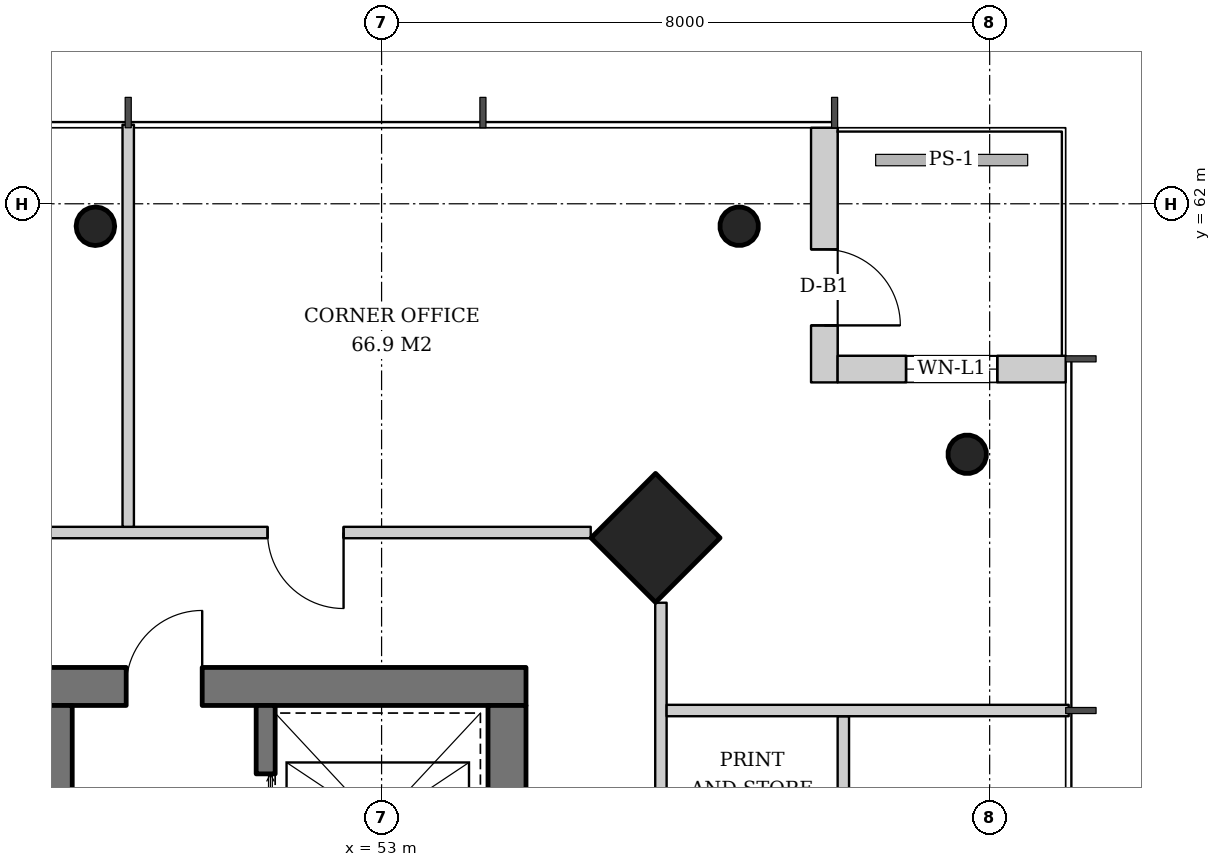
"""IFC4 building model, lengths in metres.
Left out: names, types, materials, properties, quantities, classifications, styles, units other than length and angle.
Written with IfcOpenShell. Run it as: python <this file> out.ifc"""

import sys

from ifc_helpers import new_model, si_unit, direction, frame, frame_2d, origin, origin_2d, place, context, subcontext, project, spatial, rectangle, hollow_circle, extrude, element, fill, save


model = new_model("IFC4")
c1 = context("Model", 3, precision=1e-05, world=origin(), true_north=direction((0.0, 1.0)))
c2 = subcontext(c1, "Body", "Model", "MODEL_VIEW")
j1 = project(units=[si_unit("LENGTHUNIT", "METRE"), si_unit("PLANEANGLEUNIT", "RADIAN")], contexts=[c1])
p1 = place(None, origin())
s1 = spatial("IfcSite", under=j1, at=p1, CompositionType="ELEMENT")
p2 = place(p1, origin())
s2 = spatial("IfcBuilding", under=s1, at=p2, CompositionType="ELEMENT")
p3 = place(p2, frame((0.0, 0.0, 279.4)))
s3 = spatial("IfcBuildingStorey", under=s2, at=p3, CompositionType="ELEMENT", Elevation=279.4)
p4 = place(p3, frame((56.643, 57.643, 0.0), z_axis=(-0.031898107953, -0.031898107953, 0.998981992539), x_axis=(0.707106781187, -0.707106781187, 0.0)))
e1 = element("IfcColumn", 1, at=p4, inside=s3, PredefinedType="COLUMN", context=c2, shape_type="SweptSolid", body=[
    extrude(rectangle(XDim=1.2, YDim=1.2, at=origin_2d()), origin(), (0.0, 0.0, 1.0), 3.804),
])
for number, where, z_axis, x_axis in (
    (2, (60.743, 58.743, 0.0), (-0.032, -0.032, 0.999), (0.707, -0.707, 0.0)),
    (3, (57.743, 61.743, 0.0), (-0.032, -0.032, 0.999), (0.707, -0.707, 0.0)),
):
    element("IfcColumn", number, at=place(p3, frame(where, z_axis=z_axis, x_axis=x_axis)), inside=s3, PredefinedType="COLUMN", context=c2, shape_type="SweptSolid", body=[
        extrude(hollow_circle(Radius=0.254, WallThickness=0.02, at=origin_2d()), origin(), (0.0, 0.0, 1.0), 3.804),
    ])
p5 = place(p3, frame((49.248, 61.743, 0.0), z_axis=(-0.010658893366, -0.031976680097, 0.999431778523), x_axis=(0.948683298051, -0.316227766017, 0.0)))
e4 = element("IfcColumn", 4, at=p5, inside=s3, PredefinedType="COLUMN", context=c2, shape_type="SweptSolid", body=[
    extrude(hollow_circle(Radius=0.254, WallThickness=0.02, at=origin_2d()), origin(), (0.0, 0.0, 1.0), 3.802),
])
p6 = place(p3, frame((35.1, 55.65, 0.0), z_axis=(0.0, 0.0, 1.0), x_axis=(1.0, 0.0, 0.0)))
e5 = element("IfcWall", 5, at=p6, inside=s3, PredefinedType="SHEAR", context=c2, shape_type="SweptSolid", body=[
    extrude(rectangle(XDim=19.8, YDim=0.5, at=frame_2d((9.9, 0.0))), origin(), (0.0, 0.0, 1.0), 3.8),
])
p7 = place(p6, frame((14.54, 0.0, 0.0)))
e6 = element("IfcOpeningElement", 6, at=p7, cuts=e5, PredefinedType="OPENING", context=c2, shape_type="SweptSolid", body=[
    extrude(rectangle(XDim=1.0, YDim=2.1, at=frame_2d((0.5, 1.05))), frame((0.0, 0.26, 0.0), z_axis=(0.0, -1.0, 0.0), x_axis=(1.0, 0.0, 0.0)), (0.0, 0.0, 1.0), 0.52),
])
p8 = place(p6, frame((0.865, 0.0, 0.0)))
e7 = element("IfcOpeningElement", 7, at=p8, cuts=e5, PredefinedType="OPENING", context=c2, shape_type="SweptSolid", body=[
    extrude(rectangle(XDim=1.0, YDim=2.1, at=frame_2d((0.5, 1.05))), frame((0.0, 0.26, 0.0), z_axis=(0.0, -1.0, 0.0), x_axis=(1.0, 0.0, 0.0)), (0.0, 0.0, 1.0), 0.52),
])
p9 = place(p6, frame((2.399, 0.0, 0.0)))
e8 = element("IfcOpeningElement", 8, at=p9, cuts=e5, PredefinedType="OPENING", context=c2, shape_type="SweptSolid", body=[
    extrude(rectangle(XDim=1.0, YDim=2.1, at=frame_2d((0.5, 1.05))), frame((0.0, 0.26, 0.0), z_axis=(0.0, -1.0, 0.0), x_axis=(1.0, 0.0, 0.0)), (0.0, 0.0, 1.0), 0.52),
])
p10 = place(p6, frame((3.966, 0.0, 0.0)))
e9 = element("IfcOpeningElement", 9, at=p10, cuts=e5, PredefinedType="OPENING", context=c2, shape_type="SweptSolid", body=[
    extrude(rectangle(XDim=1.0, YDim=2.1, at=frame_2d((0.5, 1.05))), frame((0.0, 0.26, 0.0), z_axis=(0.0, -1.0, 0.0), x_axis=(1.0, 0.0, 0.0)), (0.0, 0.0, 1.0), 0.52),
])
p11 = place(p3, frame((54.65, 36.6, 0.0), z_axis=(0.0, 0.0, 1.0), x_axis=(0.0, 1.0, 0.0)))
e10 = element("IfcWall", 10, at=p11, inside=s3, PredefinedType="SHEAR", context=c2, shape_type="SweptSolid", body=[
    extrude(rectangle(XDim=18.8, YDim=0.5, at=frame_2d((9.4, 0.0))), origin(), (0.0, 0.0, 1.0), 3.8),
])
p12 = place(p11, frame((8.5, 0.0, 0.0)))
e11 = element("IfcOpeningElement", 11, at=p12, cuts=e10, PredefinedType="OPENING", context=c2, shape_type="SweptSolid", body=[
    extrude(rectangle(XDim=1.8, YDim=2.4, at=frame_2d((0.9, 1.2))), frame((0.0, 0.26, 0.0), z_axis=(0.0, -1.0, 0.0), x_axis=(1.0, 0.0, 0.0)), (0.0, 0.0, 1.0), 0.52),
])
p13 = place(p3, frame((48.73, 52.4, 0.0), z_axis=(0.0, 0.0, 1.0), x_axis=(0.0, 1.0, 0.0)))
e12 = element("IfcWall", 12, at=p13, inside=s3, PredefinedType="SHEAR", context=c2, shape_type="SweptSolid", body=[
    extrude(rectangle(XDim=3.0, YDim=0.4, at=frame_2d((1.5, 0.0))), origin(), (0.0, 0.0, 1.0), 3.8),
])
p14 = place(p13, frame((0.3, 0.0, 0.0)))
e13 = element("IfcOpeningElement", 13, at=p14, cuts=e12, PredefinedType="OPENING", context=c2, shape_type="SweptSolid", body=[
    extrude(rectangle(XDim=1.0, YDim=2.1, at=frame_2d((0.5, 1.05))), frame((0.0, 0.21, 0.0), z_axis=(0.0, -1.0, 0.0), x_axis=(1.0, 0.0, 0.0)), (0.0, 0.0, 1.0), 0.42),
])
p15 = place(p3, frame((58.825, 63.0, 0.0), z_axis=(0.0, 0.0, 1.0), x_axis=(0.0, -1.0, 0.0)))
e14 = element("IfcWall", 14, at=p15, inside=s3, PredefinedType="SOLIDWALL", context=c2, shape_type="SweptSolid", body=[
    extrude(rectangle(XDim=3.35, YDim=0.35, at=frame_2d((1.675, 0.0))), origin(), (0.0, 0.0, 1.0), 3.5),
])
p16 = place(p15, frame((1.6, 0.0, 0.0)))
e15 = element("IfcOpeningElement", 15, at=p16, cuts=e14, PredefinedType="OPENING", context=c2, shape_type="SweptSolid", body=[
    extrude(rectangle(XDim=1.0, YDim=2.4, at=frame_2d((0.5, 1.2))), frame((0.0, 0.185, 0.0), z_axis=(0.0, -1.0, 0.0), x_axis=(1.0, 0.0, 0.0)), (0.0, 0.0, 1.0), 0.37),
])
p17 = place(p3, frame((59.0, 59.825, 0.0), z_axis=(0.0, 0.0, 1.0), x_axis=(1.0, 0.0, 0.0)))
e16 = element("IfcWall", 16, at=p17, inside=s3, PredefinedType="SOLIDWALL", context=c2, shape_type="SweptSolid", body=[
    extrude(rectangle(XDim=3.0, YDim=0.35, at=frame_2d((1.5, 0.0))), origin(), (0.0, 0.0, 1.0), 3.5),
])
p18 = place(p17, frame((0.9, 0.0, 0.6)))
e17 = element("IfcOpeningElement", 17, at=p18, cuts=e16, PredefinedType="OPENING", context=c2, shape_type="SweptSolid", body=[
    extrude(rectangle(XDim=1.2, YDim=2.55, at=frame_2d((0.6, 1.275))), frame((0.0, 0.185, 0.0), z_axis=(0.0, -1.0, 0.0), x_axis=(1.0, 0.0, 0.0)), (0.0, 0.0, 1.0), 0.37),
])
p19 = place(p3, frame((51.475, 52.4, 0.0), z_axis=(0.0, 0.0, 1.0), x_axis=(0.0, 1.0, 0.0)))
e18 = element("IfcWall", 18, at=p19, inside=s3, PredefinedType="SHEAR", context=c2, shape_type="SweptSolid", body=[
    extrude(rectangle(XDim=3.0, YDim=0.25, at=frame_2d((1.5, 0.0))), origin(), (0.0, 0.0, 1.0), 3.8),
])
p20 = place(p19, frame((0.8, 0.0, 0.0)))
e19 = element("IfcOpeningElement", 19, at=p20, cuts=e18, PredefinedType="OPENING", context=c2, shape_type="SweptSolid", body=[
    extrude(rectangle(XDim=1.3, YDim=2.2, at=frame_2d((0.65, 1.1))), frame((0.0, 0.135, 0.0), z_axis=(0.0, -1.0, 0.0), x_axis=(1.0, 0.0, 0.0)), (0.0, 0.0, 1.0), 0.27),
])
p21 = place(p3, frame((59.075, 50.742, 0.0), z_axis=(0.0, 0.0, 1.0), x_axis=(0.0, 1.0, 0.0)))
e20 = element("IfcWall", 20, at=p21, inside=s3, PredefinedType="PARTITIONING", context=c2, shape_type="SweptSolid", body=[
    extrude(rectangle(XDim=4.517, YDim=0.15, at=frame_2d((2.258, 0.0))), origin(), (0.0, 0.0, 1.0), 2.747),
])
p22 = place(p3, frame((56.675, 35.249, 0.0), z_axis=(0.0, 0.0, 1.0), x_axis=(0.0, 1.0, 0.0)))
e21 = element("IfcWall", 21, at=p22, inside=s3, PredefinedType="PARTITIONING", context=c2, shape_type="SweptSolid", body=[
    extrude(rectangle(XDim=21.503, YDim=0.15, at=frame_2d((10.751, 0.0))), origin(), (0.0, 0.0, 1.0), 2.747),
])
p23 = place(p22, frame((3.251, 0.0, 0.0)))
e22 = element("IfcOpeningElement", 22, at=p23, cuts=e21, PredefinedType="OPENING", context=c2, shape_type="SweptSolid", body=[
    extrude(rectangle(XDim=1.0, YDim=2.1, at=frame_2d((0.5, 1.05))), frame((0.0, 0.085, 0.0), z_axis=(0.0, -1.0, 0.0), x_axis=(1.0, 0.0, 0.0)), (0.0, 0.0, 1.0), 0.17),
])
p24 = place(p22, frame((7.918, 0.0, 0.0)))
e23 = element("IfcOpeningElement", 23, at=p24, cuts=e21, PredefinedType="OPENING", context=c2, shape_type="SweptSolid", body=[
    extrude(rectangle(XDim=1.0, YDim=2.1, at=frame_2d((0.5, 1.05))), frame((0.0, 0.085, 0.0), z_axis=(0.0, -1.0, 0.0), x_axis=(1.0, 0.0, 0.0)), (0.0, 0.0, 1.0), 0.17),
])
p25 = place(p22, frame((12.585, 0.0, 0.0)))
e24 = element("IfcOpeningElement", 24, at=p25, cuts=e21, PredefinedType="OPENING", context=c2, shape_type="SweptSolid", body=[
    extrude(rectangle(XDim=1.0, YDim=2.1, at=frame_2d((0.5, 1.05))), frame((0.0, 0.085, 0.0), z_axis=(0.0, -1.0, 0.0), x_axis=(1.0, 0.0, 0.0)), (0.0, 0.0, 1.0), 0.17),
])
p26 = place(p22, frame((17.251, 0.0, 0.0)))
e25 = element("IfcOpeningElement", 25, at=p26, cuts=e21, PredefinedType="OPENING", context=c2, shape_type="SweptSolid", body=[
    extrude(rectangle(XDim=1.0, YDim=2.1, at=frame_2d((0.5, 1.05))), frame((0.0, 0.085, 0.0), z_axis=(0.0, -1.0, 0.0), x_axis=(1.0, 0.0, 0.0)), (0.0, 0.0, 1.0), 0.17),
])
p27 = place(p3, frame((56.75, 55.333, 0.0), z_axis=(0.0, 0.0, 1.0), x_axis=(1.0, 0.0, 0.0)))
e26 = element("IfcWall", 26, at=p27, inside=s3, PredefinedType="PARTITIONING", context=c2, shape_type="SweptSolid", body=[
    extrude(rectangle(XDim=5.29, YDim=0.15, at=frame_2d((2.645, 0.0))), origin(), (0.0, 0.0, 1.0), 3.0),
])
p28 = place(p3, frame((55.751, 57.675, 0.0), z_axis=(0.0, 0.0, 1.0), x_axis=(-1.0, 0.0, 0.0)))
e27 = element("IfcWall", 27, at=p28, inside=s3, PredefinedType="PARTITIONING", context=c2, shape_type="SweptSolid", body=[
    extrude(rectangle(XDim=21.503, YDim=0.15, at=frame_2d((10.751, 0.0))), origin(), (0.0, 0.0, 1.0), 2.747),
])
p29 = place(p28, frame((3.251, 0.0, 0.0)))
e28 = element("IfcOpeningElement", 28, at=p29, cuts=e27, PredefinedType="OPENING", context=c2, shape_type="SweptSolid", body=[
    extrude(rectangle(XDim=1.0, YDim=2.1, at=frame_2d((0.5, 1.05))), frame((0.0, 0.085, 0.0), z_axis=(0.0, -1.0, 0.0), x_axis=(1.0, 0.0, 0.0)), (0.0, 0.0, 1.0), 0.17),
])
p30 = place(p28, frame((7.918, 0.0, 0.0)))
e29 = element("IfcOpeningElement", 29, at=p30, cuts=e27, PredefinedType="OPENING", context=c2, shape_type="SweptSolid", body=[
    extrude(rectangle(XDim=1.0, YDim=2.1, at=frame_2d((0.5, 1.05))), frame((0.0, 0.085, 0.0), z_axis=(0.0, -1.0, 0.0), x_axis=(1.0, 0.0, 0.0)), (0.0, 0.0, 1.0), 0.17),
])
p31 = place(p28, frame((17.251, 0.0, 0.0)))
e30 = element("IfcOpeningElement", 30, at=p31, cuts=e27, PredefinedType="OPENING", context=c2, shape_type="SweptSolid", body=[
    extrude(rectangle(XDim=1.0, YDim=2.1, at=frame_2d((0.5, 1.05))), frame((0.0, 0.085, 0.0), z_axis=(0.0, -1.0, 0.0), x_axis=(1.0, 0.0, 0.0)), (0.0, 0.0, 1.0), 0.17),
])
p32 = place(p3, frame((49.667, 57.75, 0.0), z_axis=(0.0, 0.0, 1.0), x_axis=(0.0, 1.0, 0.0)))
e31 = element("IfcWall", 31, at=p32, inside=s3, PredefinedType="PARTITIONING", context=c2, shape_type="SweptSolid", body=[
    extrude(rectangle(XDim=5.29, YDim=0.15, at=frame_2d((2.645, 0.0))), origin(), (0.0, 0.0, 1.0), 3.0),
])
p33 = place(p16, origin())
e32 = element("IfcDoor", 32, at=p33, inside=s3, OperationType="SINGLE_SWING_RIGHT", PredefinedType="DOOR", context=c2, shape_type="SweptSolid", body=[
    extrude(rectangle(XDim=1.0, YDim=2.4, at=frame_2d((0.5, 1.2))), frame((0.0, 0.025, 0.0), z_axis=(0.0, -1.0, 0.0), x_axis=(1.0, 0.0, 0.0)), (0.0, 0.0, 1.0), 0.05),
])
fill(e15, e32)
p34 = place(p18, origin())
e33 = element("IfcWindow", 33, at=p34, inside=s3, PartitioningType="SINGLE_PANEL", PredefinedType="WINDOW", context=c2, shape_type="SweptSolid", body=[
    extrude(rectangle(XDim=1.2, YDim=2.55, at=frame_2d((0.6, 1.275))), frame((0.0, 0.03, 0.0), z_axis=(0.0, -1.0, 0.0), x_axis=(1.0, 0.0, 0.0)), (0.0, 0.0, 1.0), 0.06),
])
fill(e17, e33)
p35 = place(p20, origin())
e34 = element("IfcDoor", 34, at=p35, inside=s3, OperationType="DOUBLE_DOOR_SLIDING", PredefinedType="DOOR", context=c2, shape_type="SweptSolid", body=[
    extrude(rectangle(XDim=1.3, YDim=2.2, at=frame_2d((0.65, 1.1))), frame((0.0, 0.025, 0.0), z_axis=(0.0, -1.0, 0.0), x_axis=(1.0, 0.0, 0.0)), (0.0, 0.0, 1.0), 0.05),
])
fill(e19, e34)
p36 = place(p7, origin())
e35 = element("IfcDoor", 35, at=p36, inside=s3, OperationType="SINGLE_SWING_RIGHT", PredefinedType="DOOR", context=c2, shape_type="SweptSolid", body=[
    extrude(rectangle(XDim=1.0, YDim=2.1, at=frame_2d((0.5, 1.05))), frame((0.0, 0.025, 0.0), z_axis=(0.0, -1.0, 0.0), x_axis=(1.0, 0.0, 0.0)), (0.0, 0.0, 1.0), 0.05),
])
fill(e6, e35)
p37 = place(p29, origin())
e36 = element("IfcDoor", 36, at=p37, inside=s3, OperationType="SINGLE_SWING_LEFT", PredefinedType="DOOR", context=c2, shape_type="SweptSolid", body=[
    extrude(rectangle(XDim=1.0, YDim=2.1, at=frame_2d((0.5, 1.05))), frame((0.0, 0.025, 0.0), z_axis=(0.0, -1.0, 0.0), x_axis=(1.0, 0.0, 0.0)), (0.0, 0.0, 1.0), 0.05),
])
fill(e28, e36)
save(model, sys.argv[1])
